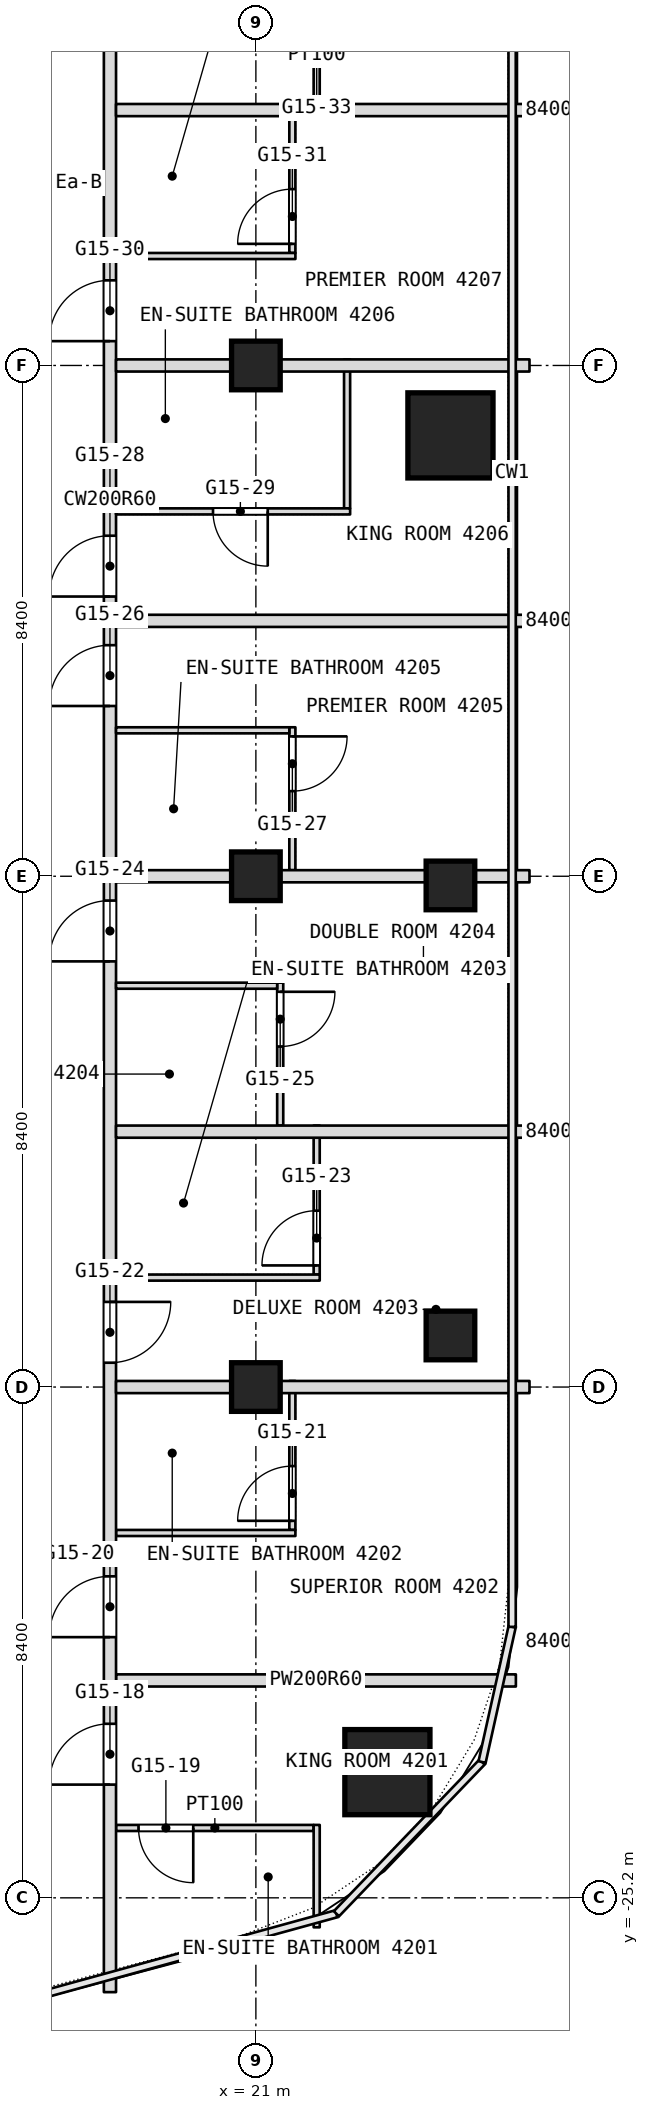
"""IFC4 building model, lengths in metres.
Left out: names, types, materials, properties, quantities, classifications, styles, units other than length and angle.
Written with IfcOpenShell. Run it as: python <this file> out.ifc"""

import sys

from ifc_helpers import new_model, si_unit, direction, frame, frame_2d, origin, origin_2d, place, context, subcontext, project, spatial, rectangle, extrude, element, fill, save


model = new_model("IFC4")
c1 = context("Model", 3, precision=1e-05, world=origin(), true_north=direction((0.0, 1.0)))
c2 = subcontext(c1, "Body", "Model", "MODEL_VIEW")
j1 = project(units=[si_unit("LENGTHUNIT", "METRE"), si_unit("PLANEANGLEUNIT", "RADIAN")], contexts=[c1])
p1 = place(None, origin())
s1 = spatial("IfcSite", under=j1, at=p1, CompositionType="ELEMENT")
p2 = place(p1, origin())
s2 = spatial("IfcBuilding", under=s1, at=p2, CompositionType="ELEMENT")
p3 = place(p2, frame((0.0, 0.0, 187.7)))
s3 = spatial("IfcBuildingStorey", under=s2, at=p3, CompositionType="ELEMENT", Elevation=187.7)
for number, where, z_axis, x_axis in (
    (1, (23.163, -23.133, 0.0), (0.0, 0.0, 1.0), (1.0, 0.0, 0.0)),
    (2, (24.2, -1.15, 0.0), (0.0, 0.0, 1.0), (1.0, 0.0, 0.0)),
):
    element("IfcColumn", number, at=place(p3, frame(where, z_axis=z_axis, x_axis=x_axis)), inside=s3, PredefinedType="COLUMN", context=c2, shape_type="SweptSolid", body=[
        extrude(rectangle(XDim=1.4, YDim=1.4, at=origin_2d()), origin(), (0.0, 0.0, 1.0), 3.6),
    ])
for number, where, z_axis, x_axis in (
    (3, (21.0, -16.8, 0.0), (0.0, 0.0, 1.0), (1.0, 0.0, 0.0)),
    (4, (21.0, -8.4, 0.0), (0.0, 0.0, 1.0), (1.0, 0.0, 0.0)),
    (5, (21.0, 0.0, 0.0), (0.0, 0.0, 1.0), (1.0, 0.0, 0.0)),
    (6, (24.2, -8.551, 0.0), (0.0, 0.0, 1.0), (1.0, 0.0, 0.0)),
    (7, (24.2, -15.952, 0.0), (0.0, 0.0, 1.0), (1.0, 0.0, 0.0)),
):
    element("IfcColumn", number, at=place(p3, frame(where, z_axis=z_axis, x_axis=x_axis)), inside=s3, PredefinedType="COLUMN", context=c2, shape_type="SweptSolid", body=[
        extrude(rectangle(XDim=0.8, YDim=0.8, at=origin_2d()), origin(), (0.0, 0.0, 1.0), 3.6),
    ])
p4 = place(p3, frame((18.7, -24.051, 0.0), z_axis=(0.0, 0.0, 1.0), x_axis=(1.0, 0.0, 0.0)))
e8 = element("IfcWall", 8, at=p4, inside=s3, PredefinedType="PARTITIONING", context=c2, shape_type="SweptSolid", body=[
    extrude(rectangle(XDim=3.25, YDim=0.1, at=frame_2d((1.625, 0.0))), origin(), (0.0, 0.0, 1.0), 3.34),
])
p5 = place(p4, frame((0.37, 0.0, 0.0)))
e9 = element("IfcOpeningElement", 9, at=p5, cuts=e8, PredefinedType="OPENING", context=c2, shape_type="SweptSolid", body=[
    extrude(rectangle(XDim=0.9, YDim=2.1, at=frame_2d((0.45, 1.05))), frame((0.0, 0.05, 0.0), z_axis=(0.0, -1.0, 0.0), x_axis=(1.0, 0.0, 0.0)), (0.0, 0.0, 1.0), 0.1),
])
p6 = place(p3, frame((22.5, -2.35, 0.0), z_axis=(0.0, 0.0, 1.0), x_axis=(0.0, 1.0, 0.0)))
e10 = element("IfcWall", 10, at=p6, inside=s3, PredefinedType="PARTITIONING", context=c2, shape_type="SweptSolid", body=[
    extrude(rectangle(XDim=2.45, YDim=0.1, at=frame_2d((1.225, 0.0))), origin(), (0.0, 0.0, 1.0), 3.34),
])
p7 = place(p3, frame((22.0, -25.685, 0.0), z_axis=(0.0, 0.0, 1.0), x_axis=(0.0, 1.0, 0.0)))
e11 = element("IfcWall", 11, at=p7, inside=s3, PredefinedType="PARTITIONING", context=c2, shape_type="SweptSolid", body=[
    extrude(rectangle(XDim=1.684, YDim=0.1, at=frame_2d((0.842, 0.0))), origin(), (0.0, 0.0, 1.0), 3.34),
])
p8 = place(p3, frame((22.0, -14.95, 0.0), z_axis=(0.0, 0.0, 1.0), x_axis=(0.0, 1.0, 0.0)))
e12 = element("IfcWall", 12, at=p8, inside=s3, PredefinedType="PARTITIONING", context=c2, shape_type="SweptSolid", body=[
    extrude(rectangle(XDim=2.45, YDim=0.1, at=frame_2d((1.225, 0.0))), origin(), (0.0, 0.0, 1.0), 3.34),
])
p9 = place(p8, frame((0.15, 0.0, 0.0)))
e13 = element("IfcOpeningElement", 13, at=p9, cuts=e12, PredefinedType="OPENING", context=c2, shape_type="SweptSolid", body=[
    extrude(rectangle(XDim=0.9, YDim=2.1, at=frame_2d((0.45, 1.05))), frame((0.0, 0.05, 0.0), z_axis=(0.0, -1.0, 0.0), x_axis=(1.0, 0.0, 0.0)), (0.0, 0.0, 1.0), 0.1),
])
p10 = place(p3, frame((22.0, 4.3, 0.0), z_axis=(0.0, 0.0, 1.0), x_axis=(0.0, 1.0, 0.0)))
e14 = element("IfcWall", 14, at=p10, inside=s3, PredefinedType="PARTITIONING", context=c2, shape_type="SweptSolid", body=[
    extrude(rectangle(XDim=2.35, YDim=0.1, at=frame_2d((1.175, 0.0))), origin(), (0.0, 0.0, 1.0), 3.34),
])
p11 = place(p10, frame((1.3, 0.0, 0.0)))
e15 = element("IfcOpeningElement", 15, at=p11, cuts=e14, PredefinedType="OPENING", context=c2, shape_type="SweptSolid", body=[
    extrude(rectangle(XDim=0.9, YDim=2.1, at=frame_2d((0.45, 1.05))), frame((0.0, 0.05, 0.0), z_axis=(0.0, -1.0, 0.0), x_axis=(1.0, 0.0, 0.0)), (0.0, 0.0, 1.0), 0.1),
])
p12 = place(p3, frame((18.7, -21.625, 0.0), z_axis=(0.0, 0.0, 1.0), x_axis=(1.0, 0.0, 0.0)))
e16 = element("IfcWall", 16, at=p12, inside=s3, PredefinedType="PARTITIONING", context=c2, shape_type="SweptSolid", body=[
    extrude(rectangle(XDim=6.576, YDim=0.2, at=frame_2d((3.288, 0.0))), origin(), (0.0, 0.0, 1.0), 3.34),
])
p13 = place(p3, frame((21.6, -19.15, 0.0), z_axis=(0.0, 0.0, 1.0), x_axis=(0.0, 1.0, 0.0)))
e17 = element("IfcWall", 17, at=p13, inside=s3, PredefinedType="PARTITIONING", context=c2, shape_type="SweptSolid", body=[
    extrude(rectangle(XDim=2.45, YDim=0.1, at=frame_2d((1.225, 0.0))), origin(), (0.0, 0.0, 1.0), 3.34),
])
p14 = place(p13, frame((0.15, 0.0, 0.0)))
e18 = element("IfcOpeningElement", 18, at=p14, cuts=e17, PredefinedType="OPENING", context=c2, shape_type="SweptSolid", body=[
    extrude(rectangle(XDim=0.9, YDim=2.1, at=frame_2d((0.45, 1.05))), frame((0.0, 0.05, 0.0), z_axis=(0.0, -1.0, 0.0), x_axis=(1.0, 0.0, 0.0)), (0.0, 0.0, 1.0), 0.1),
])
p15 = place(p3, frame((21.6, -8.3, 0.0), z_axis=(0.0, 0.0, 1.0), x_axis=(0.0, 1.0, 0.0)))
e19 = element("IfcWall", 19, at=p15, inside=s3, PredefinedType="PARTITIONING", context=c2, shape_type="SweptSolid", body=[
    extrude(rectangle(XDim=2.35, YDim=0.1, at=frame_2d((1.175, 0.0))), origin(), (0.0, 0.0, 1.0), 3.34),
])
p16 = place(p15, frame((1.3, 0.0, 0.0)))
e20 = element("IfcOpeningElement", 20, at=p16, cuts=e19, PredefinedType="OPENING", context=c2, shape_type="SweptSolid", body=[
    extrude(rectangle(XDim=0.9, YDim=2.1, at=frame_2d((0.45, 1.05))), frame((0.0, 0.05, 0.0), z_axis=(0.0, -1.0, 0.0), x_axis=(1.0, 0.0, 0.0)), (0.0, 0.0, 1.0), 0.1),
])
p17 = place(p3, frame((21.6, 1.85, 0.0), z_axis=(0.0, 0.0, 1.0), x_axis=(0.0, 1.0, 0.0)))
e21 = element("IfcWall", 21, at=p17, inside=s3, PredefinedType="PARTITIONING", context=c2, shape_type="SweptSolid", body=[
    extrude(rectangle(XDim=2.45, YDim=0.1, at=frame_2d((1.225, 0.0))), origin(), (0.0, 0.0, 1.0), 3.34),
])
p18 = place(p17, frame((0.15, 0.0, 0.0)))
e22 = element("IfcOpeningElement", 22, at=p18, cuts=e21, PredefinedType="OPENING", context=c2, shape_type="SweptSolid", body=[
    extrude(rectangle(XDim=0.9, YDim=2.1, at=frame_2d((0.45, 1.05))), frame((0.0, 0.05, 0.0), z_axis=(0.0, -1.0, 0.0), x_axis=(1.0, 0.0, 0.0)), (0.0, 0.0, 1.0), 0.1),
])
p19 = place(p3, frame((21.4, -12.5, 0.0), z_axis=(0.0, 0.0, 1.0), x_axis=(0.0, 1.0, 0.0)))
e23 = element("IfcWall", 23, at=p19, inside=s3, PredefinedType="PARTITIONING", context=c2, shape_type="SweptSolid", body=[
    extrude(rectangle(XDim=2.35, YDim=0.1, at=frame_2d((1.175, 0.0))), origin(), (0.0, 0.0, 1.0), 3.34),
])
p20 = place(p19, frame((1.3, 0.0, 0.0)))
e24 = element("IfcOpeningElement", 24, at=p20, cuts=e23, PredefinedType="OPENING", context=c2, shape_type="SweptSolid", body=[
    extrude(rectangle(XDim=0.9, YDim=2.1, at=frame_2d((0.45, 1.05))), frame((0.0, 0.05, 0.0), z_axis=(0.0, -1.0, 0.0), x_axis=(1.0, 0.0, 0.0)), (0.0, 0.0, 1.0), 0.1),
])
p21 = place(p3, frame((18.7, -19.2, 0.0), z_axis=(0.0, 0.0, 1.0), x_axis=(1.0, 0.0, 0.0)))
e25 = element("IfcWall", 25, at=p21, inside=s3, PredefinedType="PARTITIONING", context=c2, shape_type="SweptSolid", body=[
    extrude(rectangle(XDim=2.95, YDim=0.1, at=frame_2d((1.475, 0.0))), origin(), (0.0, 0.0, 1.0), 3.34),
])
p22 = place(p3, frame((18.6, -26.751, 0.0), z_axis=(0.0, 0.0, 1.0), x_axis=(0.0, 1.0, 0.0)))
e26 = element("IfcWall", 26, at=p22, inside=s3, PredefinedType="PARTITIONING", context=c2, shape_type="SweptSolid", body=[
    extrude(rectangle(XDim=49.091, YDim=0.2, at=frame_2d((24.545, 0.0))), origin(), (0.0, 0.0, 1.0), 3.34),
])
p23 = place(p22, frame((3.413, 0.0, 0.0)))
e27 = element("IfcOpeningElement", 27, at=p23, cuts=e26, PredefinedType="OPENING", context=c2, shape_type="SweptSolid", body=[
    extrude(rectangle(XDim=1.0, YDim=2.1, at=frame_2d((0.5, 1.05))), frame((0.0, 0.1, 0.0), z_axis=(0.0, -1.0, 0.0), x_axis=(1.0, 0.0, 0.0)), (0.0, 0.0, 1.0), 0.2),
])
p24 = place(p22, frame((5.838, 0.0, 0.0)))
e28 = element("IfcOpeningElement", 28, at=p24, cuts=e26, PredefinedType="OPENING", context=c2, shape_type="SweptSolid", body=[
    extrude(rectangle(XDim=1.0, YDim=2.1, at=frame_2d((0.5, 1.05))), frame((0.0, 0.1, 0.0), z_axis=(0.0, -1.0, 0.0), x_axis=(1.0, 0.0, 0.0)), (0.0, 0.0, 1.0), 0.2),
])
p25 = place(p22, frame((10.351, 0.0, 0.0)))
e29 = element("IfcOpeningElement", 29, at=p25, cuts=e26, PredefinedType="OPENING", context=c2, shape_type="SweptSolid", body=[
    extrude(rectangle(XDim=1.0, YDim=2.1, at=frame_2d((0.5, 1.05))), frame((0.0, 0.1, 0.0), z_axis=(0.0, -1.0, 0.0), x_axis=(1.0, 0.0, 0.0)), (0.0, 0.0, 1.0), 0.2),
])
p26 = place(p22, frame((16.951, 0.0, 0.0)))
e30 = element("IfcOpeningElement", 30, at=p26, cuts=e26, PredefinedType="OPENING", context=c2, shape_type="SweptSolid", body=[
    extrude(rectangle(XDim=1.0, YDim=2.1, at=frame_2d((0.5, 1.05))), frame((0.0, 0.1, 0.0), z_axis=(0.0, -1.0, 0.0), x_axis=(1.0, 0.0, 0.0)), (0.0, 0.0, 1.0), 0.2),
])
p27 = place(p22, frame((21.151, 0.0, 0.0)))
e31 = element("IfcOpeningElement", 31, at=p27, cuts=e26, PredefinedType="OPENING", context=c2, shape_type="SweptSolid", body=[
    extrude(rectangle(XDim=1.0, YDim=2.1, at=frame_2d((0.5, 1.05))), frame((0.0, 0.1, 0.0), z_axis=(0.0, -1.0, 0.0), x_axis=(1.0, 0.0, 0.0)), (0.0, 0.0, 1.0), 0.2),
])
p28 = place(p22, frame((22.951, 0.0, 0.0)))
e32 = element("IfcOpeningElement", 32, at=p28, cuts=e26, PredefinedType="OPENING", context=c2, shape_type="SweptSolid", body=[
    extrude(rectangle(XDim=1.0, YDim=2.1, at=frame_2d((0.5, 1.05))), frame((0.0, 0.1, 0.0), z_axis=(0.0, -1.0, 0.0), x_axis=(1.0, 0.0, 0.0)), (0.0, 0.0, 1.0), 0.2),
])
p29 = place(p22, frame((27.151, 0.0, 0.0)))
e33 = element("IfcOpeningElement", 33, at=p29, cuts=e26, PredefinedType="OPENING", context=c2, shape_type="SweptSolid", body=[
    extrude(rectangle(XDim=1.0, YDim=2.1, at=frame_2d((0.5, 1.05))), frame((0.0, 0.1, 0.0), z_axis=(0.0, -1.0, 0.0), x_axis=(1.0, 0.0, 0.0)), (0.0, 0.0, 1.0), 0.2),
])
p30 = place(p22, frame((33.751, 0.0, 0.0)))
e34 = element("IfcOpeningElement", 34, at=p30, cuts=e26, PredefinedType="OPENING", context=c2, shape_type="SweptSolid", body=[
    extrude(rectangle(XDim=1.0, YDim=2.1, at=frame_2d((0.5, 1.05))), frame((0.0, 0.1, 0.0), z_axis=(0.0, -1.0, 0.0), x_axis=(1.0, 0.0, 0.0)), (0.0, 0.0, 1.0), 0.2),
])
p31 = place(p22, frame((38.451, 0.0, 0.0)))
e35 = element("IfcOpeningElement", 35, at=p31, cuts=e26, PredefinedType="OPENING", context=c2, shape_type="SweptSolid", body=[
    extrude(rectangle(XDim=1.8, YDim=2.1, at=frame_2d((0.9, 1.05))), frame((0.0, 0.1, 0.0), z_axis=(0.0, -1.0, 0.0), x_axis=(1.0, 0.0, 0.0)), (0.0, 0.0, 1.0), 0.2),
])
p32 = place(p22, frame((44.051, 0.0, 0.0)))
e36 = element("IfcOpeningElement", 36, at=p32, cuts=e26, PredefinedType="OPENING", context=c2, shape_type="SweptSolid", body=[
    extrude(rectangle(XDim=1.0, YDim=2.1, at=frame_2d((0.5, 1.05))), frame((0.0, 0.1, 0.0), z_axis=(0.0, -1.0, 0.0), x_axis=(1.0, 0.0, 0.0)), (0.0, 0.0, 1.0), 0.2),
])
p33 = place(p3, frame((18.7, -16.8, 0.0), z_axis=(0.0, 0.0, 1.0), x_axis=(1.0, 0.0, 0.0)))
e37 = element("IfcWall", 37, at=p33, inside=s3, PredefinedType="PARTITIONING", context=c2, shape_type="SweptSolid", body=[
    extrude(rectangle(XDim=6.8, YDim=0.2, at=frame_2d((3.4, 0.0))), origin(), (0.0, 0.0, 1.0), 2.94),
])
p34 = place(p3, frame((18.7, -15.0, 0.0), z_axis=(0.0, 0.0, 1.0), x_axis=(1.0, 0.0, 0.0)))
e38 = element("IfcWall", 38, at=p34, inside=s3, PredefinedType="PARTITIONING", context=c2, shape_type="SweptSolid", body=[
    extrude(rectangle(XDim=3.35, YDim=0.1, at=frame_2d((1.675, 0.0))), origin(), (0.0, 0.0, 1.0), 3.34),
])
p35 = place(p3, frame((18.7, -12.6, 0.0), z_axis=(0.0, 0.0, 1.0), x_axis=(1.0, 0.0, 0.0)))
e39 = element("IfcWall", 39, at=p35, inside=s3, PredefinedType="PARTITIONING", context=c2, shape_type="SweptSolid", body=[
    extrude(rectangle(XDim=6.8, YDim=0.2, at=frame_2d((3.4, 0.0))), origin(), (0.0, 0.0, 1.0), 3.34),
])
p36 = place(p3, frame((18.7, -10.2, 0.0), z_axis=(0.0, 0.0, 1.0), x_axis=(1.0, 0.0, 0.0)))
e40 = element("IfcWall", 40, at=p36, inside=s3, PredefinedType="PARTITIONING", context=c2, shape_type="SweptSolid", body=[
    extrude(rectangle(XDim=2.65, YDim=0.1, at=frame_2d((1.325, 0.0))), origin(), (0.0, 0.0, 1.0), 3.34),
])
p37 = place(p3, frame((18.7, -8.4, 0.0), z_axis=(0.0, 0.0, 1.0), x_axis=(1.0, 0.0, 0.0)))
e41 = element("IfcWall", 41, at=p37, inside=s3, PredefinedType="PARTITIONING", context=c2, shape_type="SweptSolid", body=[
    extrude(rectangle(XDim=6.8, YDim=0.2, at=frame_2d((3.4, 0.0))), origin(), (0.0, 0.0, 1.0), 2.94),
])
p38 = place(p3, frame((18.7, -6.0, 0.0), z_axis=(0.0, 0.0, 1.0), x_axis=(1.0, 0.0, 0.0)))
e42 = element("IfcWall", 42, at=p38, inside=s3, PredefinedType="PARTITIONING", context=c2, shape_type="SweptSolid", body=[
    extrude(rectangle(XDim=2.85, YDim=0.1, at=frame_2d((1.425, 0.0))), origin(), (0.0, 0.0, 1.0), 3.34),
])
p39 = place(p3, frame((18.7, -4.2, 0.0), z_axis=(0.0, 0.0, 1.0), x_axis=(1.0, 0.0, 0.0)))
e43 = element("IfcWall", 43, at=p39, inside=s3, PredefinedType="PARTITIONING", context=c2, shape_type="SweptSolid", body=[
    extrude(rectangle(XDim=6.8, YDim=0.2, at=frame_2d((3.4, 0.0))), origin(), (0.0, 0.0, 1.0), 3.34),
])
p40 = place(p3, frame((18.7, -2.4, 0.0), z_axis=(0.0, 0.0, 1.0), x_axis=(1.0, 0.0, 0.0)))
e44 = element("IfcWall", 44, at=p40, inside=s3, PredefinedType="PARTITIONING", context=c2, shape_type="SweptSolid", body=[
    extrude(rectangle(XDim=3.85, YDim=0.1, at=frame_2d((1.925, 0.0))), origin(), (0.0, 0.0, 1.0), 3.34),
])
p41 = place(p40, frame((1.595, 0.0, 0.0)))
e45 = element("IfcOpeningElement", 45, at=p41, cuts=e44, PredefinedType="OPENING", context=c2, shape_type="SweptSolid", body=[
    extrude(rectangle(XDim=0.9, YDim=2.1, at=frame_2d((0.45, 1.05))), frame((0.0, 0.05, 0.0), z_axis=(0.0, -1.0, 0.0), x_axis=(1.0, 0.0, 0.0)), (0.0, 0.0, 1.0), 0.1),
])
p42 = place(p3, frame((18.7, 0.0, 0.0), z_axis=(0.0, 0.0, 1.0), x_axis=(1.0, 0.0, 0.0)))
e46 = element("IfcWall", 46, at=p42, inside=s3, PredefinedType="PARTITIONING", context=c2, shape_type="SweptSolid", body=[
    extrude(rectangle(XDim=6.8, YDim=0.2, at=frame_2d((3.4, 0.0))), origin(), (0.0, 0.0, 1.0), 2.94),
])
p43 = place(p3, frame((18.7, 1.8, 0.0), z_axis=(0.0, 0.0, 1.0), x_axis=(1.0, 0.0, 0.0)))
e47 = element("IfcWall", 47, at=p43, inside=s3, PredefinedType="PARTITIONING", context=c2, shape_type="SweptSolid", body=[
    extrude(rectangle(XDim=2.95, YDim=0.1, at=frame_2d((1.475, 0.0))), origin(), (0.0, 0.0, 1.0), 3.34),
])
p44 = place(p3, frame((18.7, 4.2, 0.0), z_axis=(0.0, 0.0, 1.0), x_axis=(1.0, 0.0, 0.0)))
e48 = element("IfcWall", 48, at=p44, inside=s3, PredefinedType="PARTITIONING", context=c2, shape_type="SweptSolid", body=[
    extrude(rectangle(XDim=6.8, YDim=0.2, at=frame_2d((3.4, 0.0))), origin(), (0.0, 0.0, 1.0), 3.34),
])
p45 = place(p5, origin())
e49 = element("IfcDoor", 49, at=p45, inside=s3, OperationType="SINGLE_SWING_RIGHT", PredefinedType="DOOR", context=c2, shape_type="SweptSolid", body=[
    extrude(rectangle(XDim=0.9, YDim=2.1, at=frame_2d((0.45, 1.05))), frame((0.0, 0.025, 0.0), z_axis=(0.0, -1.0, 0.0), x_axis=(1.0, 0.0, 0.0)), (0.0, 0.0, 1.0), 0.05),
])
fill(e9, e49)
p46 = place(p9, origin())
e50 = element("IfcDoor", 50, at=p46, inside=s3, OperationType="SINGLE_SWING_LEFT", PredefinedType="DOOR", context=c2, shape_type="SweptSolid", body=[
    extrude(rectangle(XDim=0.9, YDim=2.1, at=frame_2d((0.45, 1.05))), frame((0.0, 0.025, 0.0), z_axis=(0.0, -1.0, 0.0), x_axis=(1.0, 0.0, 0.0)), (0.0, 0.0, 1.0), 0.05),
])
fill(e13, e50)
p47 = place(p14, origin())
e51 = element("IfcDoor", 51, at=p47, inside=s3, OperationType="SINGLE_SWING_LEFT", PredefinedType="DOOR", context=c2, shape_type="SweptSolid", body=[
    extrude(rectangle(XDim=0.9, YDim=2.1, at=frame_2d((0.45, 1.05))), frame((0.0, 0.025, 0.0), z_axis=(0.0, -1.0, 0.0), x_axis=(1.0, 0.0, 0.0)), (0.0, 0.0, 1.0), 0.05),
])
fill(e18, e51)
p48 = place(p16, origin())
e52 = element("IfcDoor", 52, at=p48, inside=s3, OperationType="SINGLE_SWING_RIGHT", PredefinedType="DOOR", context=c2, shape_type="SweptSolid", body=[
    extrude(rectangle(XDim=0.9, YDim=2.1, at=frame_2d((0.45, 1.05))), frame((0.0, 0.025, 0.0), z_axis=(0.0, -1.0, 0.0), x_axis=(1.0, 0.0, 0.0)), (0.0, 0.0, 1.0), 0.05),
])
fill(e20, e52)
p49 = place(p18, origin())
e53 = element("IfcDoor", 53, at=p49, inside=s3, OperationType="SINGLE_SWING_LEFT", PredefinedType="DOOR", context=c2, shape_type="SweptSolid", body=[
    extrude(rectangle(XDim=0.9, YDim=2.1, at=frame_2d((0.45, 1.05))), frame((0.0, 0.025, 0.0), z_axis=(0.0, -1.0, 0.0), x_axis=(1.0, 0.0, 0.0)), (0.0, 0.0, 1.0), 0.05),
])
fill(e22, e53)
p50 = place(p20, origin())
e54 = element("IfcDoor", 54, at=p50, inside=s3, OperationType="SINGLE_SWING_RIGHT", PredefinedType="DOOR", context=c2, shape_type="SweptSolid", body=[
    extrude(rectangle(XDim=0.9, YDim=2.1, at=frame_2d((0.45, 1.05))), frame((0.0, 0.025, 0.0), z_axis=(0.0, -1.0, 0.0), x_axis=(1.0, 0.0, 0.0)), (0.0, 0.0, 1.0), 0.05),
])
fill(e24, e54)
p51 = place(p23, origin())
e55 = element("IfcDoor", 55, at=p51, inside=s3, OperationType="SINGLE_SWING_RIGHT", PredefinedType="DOOR", context=c2, shape_type="SweptSolid", body=[
    extrude(rectangle(XDim=1.0, YDim=2.1, at=frame_2d((0.5, 1.05))), frame((0.0, 0.025, 0.0), z_axis=(0.0, -1.0, 0.0), x_axis=(1.0, 0.0, 0.0)), (0.0, 0.0, 1.0), 0.05),
])
fill(e27, e55)
p52 = place(p24, origin())
e56 = element("IfcDoor", 56, at=p52, inside=s3, OperationType="SINGLE_SWING_RIGHT", PredefinedType="DOOR", context=c2, shape_type="SweptSolid", body=[
    extrude(rectangle(XDim=1.0, YDim=2.1, at=frame_2d((0.5, 1.05))), frame((0.0, 0.025, 0.0), z_axis=(0.0, -1.0, 0.0), x_axis=(1.0, 0.0, 0.0)), (0.0, 0.0, 1.0), 0.05),
])
fill(e28, e56)
p53 = place(p25, origin())
e57 = element("IfcDoor", 57, at=p53, inside=s3, OperationType="SINGLE_SWING_RIGHT", PredefinedType="DOOR", context=c2, shape_type="SweptSolid", body=[
    extrude(rectangle(XDim=1.0, YDim=2.1, at=frame_2d((0.5, 1.05))), frame((0.0, 0.025, 0.0), z_axis=(0.0, -1.0, 0.0), x_axis=(1.0, 0.0, 0.0)), (0.0, 0.0, 1.0), 0.05),
])
fill(e29, e57)
p54 = place(p26, origin())
e58 = element("IfcDoor", 58, at=p54, inside=s3, OperationType="SINGLE_SWING_RIGHT", PredefinedType="DOOR", context=c2, shape_type="SweptSolid", body=[
    extrude(rectangle(XDim=1.0, YDim=2.1, at=frame_2d((0.5, 1.05))), frame((0.0, 0.025, 0.0), z_axis=(0.0, -1.0, 0.0), x_axis=(1.0, 0.0, 0.0)), (0.0, 0.0, 1.0), 0.05),
])
fill(e30, e58)
p55 = place(p27, origin())
e59 = element("IfcDoor", 59, at=p55, inside=s3, OperationType="SINGLE_SWING_RIGHT", PredefinedType="DOOR", context=c2, shape_type="SweptSolid", body=[
    extrude(rectangle(XDim=1.0, YDim=2.1, at=frame_2d((0.5, 1.05))), frame((0.0, 0.025, 0.0), z_axis=(0.0, -1.0, 0.0), x_axis=(1.0, 0.0, 0.0)), (0.0, 0.0, 1.0), 0.05),
])
fill(e31, e59)
p56 = place(p28, origin())
e60 = element("IfcDoor", 60, at=p56, inside=s3, OperationType="SINGLE_SWING_RIGHT", PredefinedType="DOOR", context=c2, shape_type="SweptSolid", body=[
    extrude(rectangle(XDim=1.0, YDim=2.1, at=frame_2d((0.5, 1.05))), frame((0.0, 0.025, 0.0), z_axis=(0.0, -1.0, 0.0), x_axis=(1.0, 0.0, 0.0)), (0.0, 0.0, 1.0), 0.05),
])
fill(e32, e60)
p57 = place(p29, origin())
e61 = element("IfcDoor", 61, at=p57, inside=s3, OperationType="SINGLE_SWING_RIGHT", PredefinedType="DOOR", context=c2, shape_type="SweptSolid", body=[
    extrude(rectangle(XDim=1.0, YDim=2.1, at=frame_2d((0.5, 1.05))), frame((0.0, 0.025, 0.0), z_axis=(0.0, -1.0, 0.0), x_axis=(1.0, 0.0, 0.0)), (0.0, 0.0, 1.0), 0.05),
])
fill(e33, e61)
p58 = place(p41, origin())
e62 = element("IfcDoor", 62, at=p58, inside=s3, OperationType="SINGLE_SWING_RIGHT", PredefinedType="DOOR", context=c2, shape_type="SweptSolid", body=[
    extrude(rectangle(XDim=0.9, YDim=2.1, at=frame_2d((0.45, 1.05))), frame((0.0, 0.025, 0.0), z_axis=(0.0, -1.0, 0.0), x_axis=(1.0, 0.0, 0.0)), (0.0, 0.0, 1.0), 0.05),
])
fill(e45, e62)
save(model, sys.argv[1])
